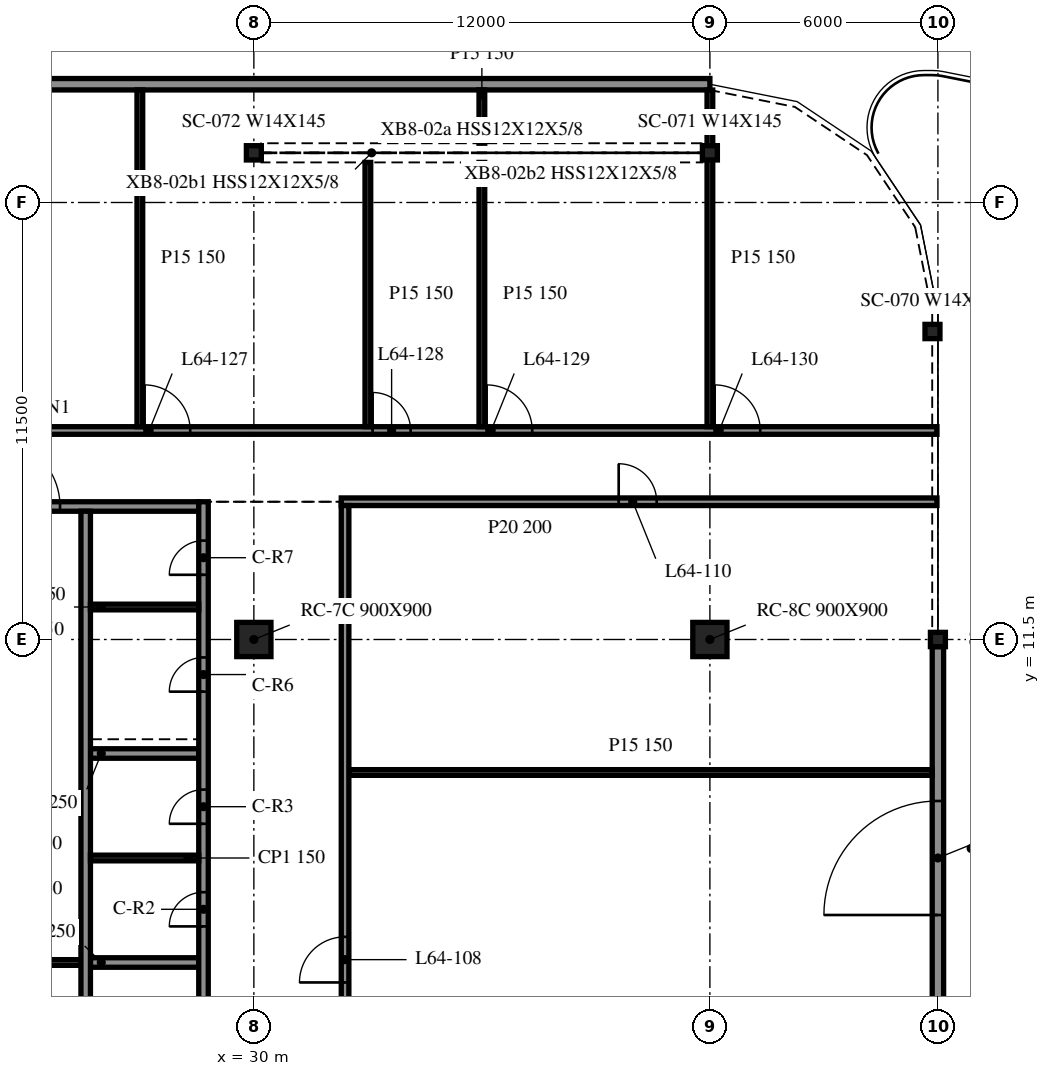
"""IFC4 building model, lengths in metres.
Left out: names, types, materials, properties, quantities, classifications, styles, units other than length and angle.
Written with IfcOpenShell. Run it as: python <this file> out.ifc"""

import sys

from ifc_helpers import new_model, si_unit, direction, frame, frame_2d, origin, origin_2d, place, context, subcontext, project, spatial, rectangle, i_section, extrude, element, fill, save


model = new_model("IFC4")
c1 = context("Model", 3, precision=1e-05, world=origin(), true_north=direction((0.0, 1.0)))
c2 = subcontext(c1, "Body", "Model", "MODEL_VIEW")
j1 = project(units=[si_unit("LENGTHUNIT", "METRE"), si_unit("PLANEANGLEUNIT", "RADIAN")], contexts=[c1])
p1 = place(None, origin())
s1 = spatial("IfcSite", under=j1, at=p1, CompositionType="ELEMENT")
p2 = place(p1, origin())
s2 = spatial("IfcBuilding", under=s1, at=p2, CompositionType="ELEMENT")
p3 = place(p2, frame((0.0, 0.0, 263.3)))
s3 = spatial("IfcBuildingStorey", under=s2, at=p3, CompositionType="ELEMENT", Elevation=263.3)
for number, where, z_axis, x_axis in (
    (1, (30.0, 11.5, -0.34), (0.0, 0.0, 1.0), (1.0, 0.0, 0.0)),
    (2, (42.0, 11.5, -0.34), (0.0, 0.0, 1.0), (1.0, 0.0, 0.0)),
):
    element("IfcColumn", number, at=place(p3, frame(where, z_axis=z_axis, x_axis=x_axis)), inside=s3, PredefinedType="COLUMN", context=c2, shape_type="SweptSolid", body=[
        extrude(rectangle(XDim=0.9, YDim=0.9, at=origin_2d()), origin(), (0.0, 0.0, 1.0), 3.8),
    ])
for number, where, z_axis, x_axis in (
    (3, (47.857, 19.605, -0.34), (0.0, 0.0, 1.0), (1.0, 0.0, 0.0)),
    (4, (42.0, 24.307, -0.34), (0.0, 0.0, 1.0), (1.0, 0.0, 0.0)),
    (5, (30.0, 24.307, -0.34), (0.0, 0.0, 1.0), (1.0, 0.0, 0.0)),
    (6, (48.0, 11.5, -0.34), (0.0, 0.0, 1.0), (1.0, 0.0, 0.0)),
):
    element("IfcColumn", number, at=place(p3, frame(where, z_axis=z_axis, x_axis=x_axis)), inside=s3, PredefinedType="COLUMN", context=c2, shape_type="SweptSolid", body=[
        extrude(i_section(OverallWidth=0.394, OverallDepth=0.376, WebThickness=0.017, FlangeThickness=0.028, at=origin_2d()), origin(), (0.0, 0.0, 1.0), 3.8),
    ])
p4 = place(p3, frame((42.0, 26.112, 0.0), z_axis=(0.0, 0.0, 1.0), x_axis=(-1.0, 0.0, 0.0)))
e7 = element("IfcWall", 7, at=p4, inside=s3, PredefinedType="NOTDEFINED", context=c2, shape_type="SweptSolid", body=[
    extrude(rectangle(XDim=84.0, YDim=0.3, at=frame_2d((42.0, 0.0))), origin(), (0.0, 0.0, 1.0), 2.853),
])
p5 = place(p3, frame((48.0, 0.188, 0.0), z_axis=(0.0, 0.0, 1.0), x_axis=(0.0, 1.0, 0.0)))
e8 = element("IfcWall", 8, at=p5, inside=s3, PredefinedType="NOTDEFINED", context=c2, shape_type="SweptSolid", body=[
    extrude(rectangle(XDim=11.124, YDim=0.3, at=frame_2d((5.562, 0.0))), origin(), (0.0, 0.0, 1.0), 2.853),
])
p6 = place(p5, frame((4.062, 0.0, 0.0)))
e9 = element("IfcOpeningElement", 9, at=p6, cuts=e8, PredefinedType="OPENING", context=c2, shape_type="SweptSolid", body=[
    extrude(rectangle(XDim=3.0, YDim=2.4, at=frame_2d((1.5, 1.2))), frame((0.0, 0.16, 0.0), z_axis=(0.0, -1.0, 0.0), x_axis=(1.0, 0.0, 0.0)), (0.0, 0.0, 1.0), 0.32),
])
p7 = place(p3, frame((28.675, -9.125, 0.0), z_axis=(0.0, 0.0, 1.0), x_axis=(0.0, 1.0, 0.0)))
e10 = element("IfcWall", 10, at=p7, inside=s3, PredefinedType="SOLIDWALL", context=c2, shape_type="SweptSolid", body=[
    extrude(rectangle(XDim=24.25, YDim=0.25, at=frame_2d((12.125, 0.0))), origin(), (0.0, 0.0, 1.0), 3.46),
])
p8 = place(p7, frame((13.075, 0.0, 0.0)))
e11 = element("IfcOpeningElement", 11, at=p8, cuts=e10, PredefinedType="OPENING", context=c2, shape_type="SweptSolid", body=[
    extrude(rectangle(XDim=0.9, YDim=2.1, at=frame_2d((0.45, 1.05))), frame((0.0, 0.135, 0.0), z_axis=(0.0, -1.0, 0.0), x_axis=(1.0, 0.0, 0.0)), (0.0, 0.0, 1.0), 0.27),
])
p9 = place(p7, frame((15.775, 0.0, 0.0)))
e12 = element("IfcOpeningElement", 12, at=p9, cuts=e10, PredefinedType="OPENING", context=c2, shape_type="SweptSolid", body=[
    extrude(rectangle(XDim=0.9, YDim=2.1, at=frame_2d((0.45, 1.05))), frame((0.0, 0.135, 0.0), z_axis=(0.0, -1.0, 0.0), x_axis=(1.0, 0.0, 0.0)), (0.0, 0.0, 1.0), 0.27),
])
p10 = place(p7, frame((19.252, 0.0, 0.0)))
e13 = element("IfcOpeningElement", 13, at=p10, cuts=e10, PredefinedType="OPENING", context=c2, shape_type="SweptSolid", body=[
    extrude(rectangle(XDim=0.9, YDim=2.1, at=frame_2d((0.45, 1.05))), frame((0.0, 0.135, 0.0), z_axis=(0.0, -1.0, 0.0), x_axis=(1.0, 0.0, 0.0)), (0.0, 0.0, 1.0), 0.27),
])
p11 = place(p7, frame((22.327, 0.0, 0.0)))
e14 = element("IfcOpeningElement", 14, at=p11, cuts=e10, PredefinedType="OPENING", context=c2, shape_type="SweptSolid", body=[
    extrude(rectangle(XDim=0.9, YDim=2.1, at=frame_2d((0.45, 1.05))), frame((0.0, 0.135, 0.0), z_axis=(0.0, -1.0, 0.0), x_axis=(1.0, 0.0, 0.0)), (0.0, 0.0, 1.0), 0.27),
])
p12 = place(p3, frame((19.45, 15.0, 0.0), z_axis=(0.0, 0.0, 1.0), x_axis=(1.0, 0.0, 0.0)))
e15 = element("IfcWall", 15, at=p12, inside=s3, PredefinedType="SOLIDWALL", context=c2, shape_type="SweptSolid", body=[
    extrude(rectangle(XDim=9.1, YDim=0.25, at=frame_2d((4.55, 0.0))), origin(), (0.0, 0.0, 1.0), 3.46),
])
p13 = place(p12, frame((3.65, 0.0, 0.0)))
e16 = element("IfcOpeningElement", 16, at=p13, cuts=e15, PredefinedType="OPENING", context=c2, shape_type="SweptSolid", body=[
    extrude(rectangle(XDim=1.8, YDim=2.1, at=frame_2d((0.9, 1.05))), frame((0.0, 0.135, 0.0), z_axis=(0.0, -1.0, 0.0), x_axis=(1.0, 0.0, 0.0)), (0.0, 0.0, 1.0), 0.27),
])
p14 = place(p3, frame((25.575, 14.875, 0.0), z_axis=(0.0, 0.0, 1.0), x_axis=(0.0, -1.0, 0.0)))
e17 = element("IfcWall", 17, at=p14, inside=s3, PredefinedType="SOLIDWALL", context=c2, shape_type="SweptSolid", body=[
    extrude(rectangle(XDim=17.5, YDim=0.25, at=frame_2d((8.75, 0.0))), origin(), (0.0, 0.0, 1.0), 3.46),
])
p15 = place(p14, frame((15.45, 0.0, 0.0)))
e18 = element("IfcOpeningElement", 18, at=p15, cuts=e17, PredefinedType="OPENING", context=c2, shape_type="SweptSolid", body=[
    extrude(rectangle(XDim=1.1, YDim=2.1, at=frame_2d((0.55, 1.05))), frame((0.0, 0.135, 0.0), z_axis=(0.0, -1.0, 0.0), x_axis=(1.0, 0.0, 0.0)), (0.0, 0.0, 1.0), 0.27),
])
p16 = place(p14, frame((12.8, 0.0, 0.0)))
e19 = element("IfcOpeningElement", 19, at=p16, cuts=e17, PredefinedType="OPENING", context=c2, shape_type="SweptSolid", body=[
    extrude(rectangle(XDim=0.9, YDim=2.1, at=frame_2d((0.45, 1.05))), frame((0.0, 0.135, 0.0), z_axis=(0.0, -1.0, 0.0), x_axis=(1.0, 0.0, 0.0)), (0.0, 0.0, 1.0), 0.27),
])
for number, where, z_axis, x_axis in (
    (20, (25.7, 3.0, 0.0), (0.0, 0.0, 1.0), (1.0, 0.0, 0.0)),
    (21, (25.7, 8.5, 0.0), (0.0, 0.0, 1.0), (1.0, 0.0, 0.0)),
):
    element("IfcWall", number, at=place(p3, frame(where, z_axis=z_axis, x_axis=x_axis)), inside=s3, PredefinedType="SOLIDWALL", context=c2, shape_type="SweptSolid", body=[
        extrude(rectangle(XDim=2.85, YDim=0.25, at=frame_2d((1.425, 0.0))), origin(), (0.0, 0.0, 1.0), 3.46),
    ])
p17 = place(p3, frame((22.55, 3.0, 0.0), z_axis=(0.0, 0.0, 1.0), x_axis=(1.0, 0.0, 0.0)))
e22 = element("IfcWall", 22, at=p17, inside=s3, PredefinedType="PARTITIONING", context=c2, shape_type="SweptSolid", body=[
    extrude(rectangle(XDim=2.9, YDim=0.15, at=frame_2d((1.45, 0.0))), origin(), (0.0, 0.0, 1.0), 3.46),
])
for number, where, z_axis, x_axis in (
    (23, (25.7, 5.75, 0.0), (0.0, 0.0, 1.0), (1.0, 0.0, 0.0)),
    (24, (25.7, 12.355, 0.0), (0.0, 0.0, 1.0), (1.0, 0.0, 0.0)),
):
    element("IfcWall", number, at=place(p3, frame(where, z_axis=z_axis, x_axis=x_axis)), inside=s3, PredefinedType="PARTITIONING", context=c2, shape_type="SweptSolid", body=[
        extrude(rectangle(XDim=2.85, YDim=0.15, at=frame_2d((1.425, 0.0))), origin(), (0.0, 0.0, 1.0), 3.46),
    ])
p18 = place(p3, frame((32.5, 8.0, 0.0), z_axis=(0.0, 0.0, 1.0), x_axis=(1.0, 0.0, 0.0)))
e25 = element("IfcWall", 25, at=p18, inside=s3, PredefinedType="PARTITIONING", context=c2, shape_type="SweptSolid", body=[
    extrude(rectangle(XDim=15.35, YDim=0.15, at=frame_2d((7.675, 0.0))), origin(), (0.0, 0.0, 1.0), 3.46),
])
p19 = place(p3, frame((32.3, 15.125, 0.0), z_axis=(0.0, 0.0, 1.0), x_axis=(1.0, 0.0, 0.0)))
e26 = element("IfcWall", 26, at=p19, inside=s3, PredefinedType="PARTITIONING", context=c2, shape_type="SweptSolid", body=[
    extrude(rectangle(XDim=15.675, YDim=0.2, at=frame_2d((7.837, 0.0))), origin(), (0.0, 0.0, 1.0), 3.46),
])
p20 = place(p19, frame((7.3, 0.0, 0.0)))
e27 = element("IfcOpeningElement", 27, at=p20, cuts=e26, PredefinedType="OPENING", context=c2, shape_type="SweptSolid", body=[
    extrude(rectangle(XDim=1.0, YDim=2.1, at=frame_2d((0.5, 1.05))), frame((0.0, 0.11, 0.0), z_axis=(0.0, -1.0, 0.0), x_axis=(1.0, 0.0, 0.0)), (0.0, 0.0, 1.0), 0.22),
])
p21 = place(p3, frame((-47.975, 17.0, 0.0), z_axis=(0.0, 0.0, 1.0), x_axis=(1.0, 0.0, 0.0)))
e28 = element("IfcWall", 28, at=p21, inside=s3, PredefinedType="PARTITIONING", context=c2, shape_type="SweptSolid", body=[
    extrude(rectangle(XDim=95.95, YDim=0.2, at=frame_2d((47.975, 0.0))), origin(), (0.0, 0.0, 1.0), 3.46),
])
p22 = place(p21, frame((4.5, 0.0, 0.0)))
e29 = element("IfcOpeningElement", 29, at=p22, cuts=e28, PredefinedType="OPENING", context=c2, shape_type="SweptSolid", body=[
    extrude(rectangle(XDim=1.0, YDim=2.1, at=frame_2d((0.5, 1.05))), frame((0.0, 0.11, 0.0), z_axis=(0.0, -1.0, 0.0), x_axis=(1.0, 0.0, 0.0)), (0.0, 0.0, 1.0), 0.22),
])
p23 = place(p21, frame((10.3, 0.0, 0.0)))
e30 = element("IfcOpeningElement", 30, at=p23, cuts=e28, PredefinedType="OPENING", context=c2, shape_type="SweptSolid", body=[
    extrude(rectangle(XDim=1.2, YDim=2.1, at=frame_2d((0.6, 1.05))), frame((0.0, 0.11, 0.0), z_axis=(0.0, -1.0, 0.0), x_axis=(1.0, 0.0, 0.0)), (0.0, 0.0, 1.0), 0.22),
])
p24 = place(p21, frame((16.3, 0.0, 0.0)))
e31 = element("IfcOpeningElement", 31, at=p24, cuts=e28, PredefinedType="OPENING", context=c2, shape_type="SweptSolid", body=[
    extrude(rectangle(XDim=1.2, YDim=2.1, at=frame_2d((0.6, 1.05))), frame((0.0, 0.11, 0.0), z_axis=(0.0, -1.0, 0.0), x_axis=(1.0, 0.0, 0.0)), (0.0, 0.0, 1.0), 0.22),
])
p25 = place(p21, frame((19.5, 0.0, 0.0)))
e32 = element("IfcOpeningElement", 32, at=p25, cuts=e28, PredefinedType="OPENING", context=c2, shape_type="SweptSolid", body=[
    extrude(rectangle(XDim=1.0, YDim=2.1, at=frame_2d((0.5, 1.05))), frame((0.0, 0.11, 0.0), z_axis=(0.0, -1.0, 0.0), x_axis=(1.0, 0.0, 0.0)), (0.0, 0.0, 1.0), 0.22),
])
p26 = place(p21, frame((25.3, 0.0, 0.0)))
e33 = element("IfcOpeningElement", 33, at=p26, cuts=e28, PredefinedType="OPENING", context=c2, shape_type="SweptSolid", body=[
    extrude(rectangle(XDim=1.2, YDim=2.1, at=frame_2d((0.6, 1.05))), frame((0.0, 0.11, 0.0), z_axis=(0.0, -1.0, 0.0), x_axis=(1.0, 0.0, 0.0)), (0.0, 0.0, 1.0), 0.22),
])
p27 = place(p21, frame((31.3, 0.0, 0.0)))
e34 = element("IfcOpeningElement", 34, at=p27, cuts=e28, PredefinedType="OPENING", context=c2, shape_type="SweptSolid", body=[
    extrude(rectangle(XDim=1.2, YDim=2.1, at=frame_2d((0.6, 1.05))), frame((0.0, 0.11, 0.0), z_axis=(0.0, -1.0, 0.0), x_axis=(1.0, 0.0, 0.0)), (0.0, 0.0, 1.0), 0.22),
])
p28 = place(p21, frame((37.5, 0.0, 0.0)))
e35 = element("IfcOpeningElement", 35, at=p28, cuts=e28, PredefinedType="OPENING", context=c2, shape_type="SweptSolid", body=[
    extrude(rectangle(XDim=1.0, YDim=2.1, at=frame_2d((0.5, 1.05))), frame((0.0, 0.11, 0.0), z_axis=(0.0, -1.0, 0.0), x_axis=(1.0, 0.0, 0.0)), (0.0, 0.0, 1.0), 0.22),
])
p29 = place(p21, frame((40.3, 0.0, 0.0)))
e36 = element("IfcOpeningElement", 36, at=p29, cuts=e28, PredefinedType="OPENING", context=c2, shape_type="SweptSolid", body=[
    extrude(rectangle(XDim=1.2, YDim=2.1, at=frame_2d((0.6, 1.05))), frame((0.0, 0.11, 0.0), z_axis=(0.0, -1.0, 0.0), x_axis=(1.0, 0.0, 0.0)), (0.0, 0.0, 1.0), 0.22),
])
p30 = place(p21, frame((46.3, 0.0, 0.0)))
e37 = element("IfcOpeningElement", 37, at=p30, cuts=e28, PredefinedType="OPENING", context=c2, shape_type="SweptSolid", body=[
    extrude(rectangle(XDim=1.2, YDim=2.1, at=frame_2d((0.6, 1.05))), frame((0.0, 0.11, 0.0), z_axis=(0.0, -1.0, 0.0), x_axis=(1.0, 0.0, 0.0)), (0.0, 0.0, 1.0), 0.22),
])
p31 = place(p21, frame((48.1, 0.0, 0.0)))
e38 = element("IfcOpeningElement", 38, at=p31, cuts=e28, PredefinedType="OPENING", context=c2, shape_type="SweptSolid", body=[
    extrude(rectangle(XDim=1.0, YDim=2.1, at=frame_2d((0.5, 1.05))), frame((0.0, 0.11, 0.0), z_axis=(0.0, -1.0, 0.0), x_axis=(1.0, 0.0, 0.0)), (0.0, 0.0, 1.0), 0.22),
])
p32 = place(p21, frame((54.1, 0.0, 0.0)))
e39 = element("IfcOpeningElement", 39, at=p32, cuts=e28, PredefinedType="OPENING", context=c2, shape_type="SweptSolid", body=[
    extrude(rectangle(XDim=1.2, YDim=2.1, at=frame_2d((0.6, 1.05))), frame((0.0, 0.11, 0.0), z_axis=(0.0, -1.0, 0.0), x_axis=(1.0, 0.0, 0.0)), (0.0, 0.0, 1.0), 0.22),
])
p33 = place(p21, frame((60.1, 0.0, 0.0)))
e40 = element("IfcOpeningElement", 40, at=p33, cuts=e28, PredefinedType="OPENING", context=c2, shape_type="SweptSolid", body=[
    extrude(rectangle(XDim=1.2, YDim=2.1, at=frame_2d((0.6, 1.05))), frame((0.0, 0.11, 0.0), z_axis=(0.0, -1.0, 0.0), x_axis=(1.0, 0.0, 0.0)), (0.0, 0.0, 1.0), 0.22),
])
p34 = place(p21, frame((63.1, 0.0, 0.0)))
e41 = element("IfcOpeningElement", 41, at=p34, cuts=e28, PredefinedType="OPENING", context=c2, shape_type="SweptSolid", body=[
    extrude(rectangle(XDim=1.0, YDim=2.1, at=frame_2d((0.5, 1.05))), frame((0.0, 0.11, 0.0), z_axis=(0.0, -1.0, 0.0), x_axis=(1.0, 0.0, 0.0)), (0.0, 0.0, 1.0), 0.22),
])
p35 = place(p21, frame((69.1, 0.0, 0.0)))
e42 = element("IfcOpeningElement", 42, at=p35, cuts=e28, PredefinedType="OPENING", context=c2, shape_type="SweptSolid", body=[
    extrude(rectangle(XDim=1.2, YDim=2.1, at=frame_2d((0.6, 1.05))), frame((0.0, 0.11, 0.0), z_axis=(0.0, -1.0, 0.0), x_axis=(1.0, 0.0, 0.0)), (0.0, 0.0, 1.0), 0.22),
])
p36 = place(p21, frame((75.1, 0.0, 0.0)))
e43 = element("IfcOpeningElement", 43, at=p36, cuts=e28, PredefinedType="OPENING", context=c2, shape_type="SweptSolid", body=[
    extrude(rectangle(XDim=1.2, YDim=2.1, at=frame_2d((0.6, 1.05))), frame((0.0, 0.11, 0.0), z_axis=(0.0, -1.0, 0.0), x_axis=(1.0, 0.0, 0.0)), (0.0, 0.0, 1.0), 0.22),
])
p37 = place(p21, frame((81.1, 0.0, 0.0)))
e44 = element("IfcOpeningElement", 44, at=p37, cuts=e28, PredefinedType="OPENING", context=c2, shape_type="SweptSolid", body=[
    extrude(rectangle(XDim=1.0, YDim=2.1, at=frame_2d((0.5, 1.05))), frame((0.0, 0.11, 0.0), z_axis=(0.0, -1.0, 0.0), x_axis=(1.0, 0.0, 0.0)), (0.0, 0.0, 1.0), 0.22),
])
p38 = place(p21, frame((84.1, 0.0, 0.0)))
e45 = element("IfcOpeningElement", 45, at=p38, cuts=e28, PredefinedType="OPENING", context=c2, shape_type="SweptSolid", body=[
    extrude(rectangle(XDim=1.2, YDim=2.1, at=frame_2d((0.6, 1.05))), frame((0.0, 0.11, 0.0), z_axis=(0.0, -1.0, 0.0), x_axis=(1.0, 0.0, 0.0)), (0.0, 0.0, 1.0), 0.22),
])
p39 = place(p21, frame((90.1, 0.0, 0.0)))
e46 = element("IfcOpeningElement", 46, at=p39, cuts=e28, PredefinedType="OPENING", context=c2, shape_type="SweptSolid", body=[
    extrude(rectangle(XDim=1.2, YDim=2.1, at=frame_2d((0.6, 1.05))), frame((0.0, 0.11, 0.0), z_axis=(0.0, -1.0, 0.0), x_axis=(1.0, 0.0, 0.0)), (0.0, 0.0, 1.0), 0.22),
])
p40 = place(p3, frame((27.0, 17.1, 0.0), z_axis=(0.0, 0.0, 1.0), x_axis=(0.0, 1.0, 0.0)))
e47 = element("IfcWall", 47, at=p40, inside=s3, PredefinedType="PARTITIONING", context=c2, shape_type="SweptSolid", body=[
    extrude(rectangle(XDim=8.862, YDim=0.15, at=frame_2d((4.431, 0.0))), origin(), (0.0, 0.0, 1.0), 3.46),
])
p41 = place(p3, frame((32.4, -9.025, 0.0), z_axis=(0.0, 0.0, 1.0), x_axis=(0.0, 1.0, 0.0)))
e48 = element("IfcWall", 48, at=p41, inside=s3, PredefinedType="PARTITIONING", context=c2, shape_type="SweptSolid", body=[
    extrude(rectangle(XDim=24.05, YDim=0.2, at=frame_2d((12.025, 0.0))), origin(), (0.0, 0.0, 1.0), 3.46),
])
p42 = place(p41, frame((11.5, 0.0, 0.0)))
e49 = element("IfcOpeningElement", 49, at=p42, cuts=e48, PredefinedType="OPENING", context=c2, shape_type="SweptSolid", body=[
    extrude(rectangle(XDim=1.2, YDim=2.1, at=frame_2d((0.6, 1.05))), frame((0.0, 0.11, 0.0), z_axis=(0.0, -1.0, 0.0), x_axis=(1.0, 0.0, 0.0)), (0.0, 0.0, 1.0), 0.22),
])
for number, where, z_axis, x_axis in (
    (50, (33.0, 17.1, 0.0), (0.0, 0.0, 1.0), (0.0, 1.0, 0.0)),
    (51, (36.0, 17.1, 0.0), (0.0, 0.0, 1.0), (0.0, 1.0, 0.0)),
):
    element("IfcWall", number, at=place(p3, frame(where, z_axis=z_axis, x_axis=x_axis)), inside=s3, PredefinedType="PARTITIONING", context=c2, shape_type="SweptSolid", body=[
        extrude(rectangle(XDim=6.955, YDim=0.15, at=frame_2d((3.477, 0.0))), origin(), (0.0, 0.0, 1.0), 3.46),
    ])
p43 = place(p3, frame((36.0, 24.559, 0.0), z_axis=(0.0, 0.0, 1.0), x_axis=(0.0, 1.0, 0.0)))
e52 = element("IfcWall", 52, at=p43, inside=s3, PredefinedType="PARTITIONING", context=c2, shape_type="SweptSolid", body=[
    extrude(rectangle(XDim=1.403, YDim=0.15, at=frame_2d((0.701, 0.0))), origin(), (0.0, 0.0, 1.0), 3.46),
])
p44 = place(p3, frame((42.0, 17.1, 0.0), z_axis=(0.0, 0.0, 1.0), x_axis=(0.0, 1.0, 0.0)))
e53 = element("IfcWall", 53, at=p44, inside=s3, PredefinedType="PARTITIONING", context=c2, shape_type="SweptSolid", body=[
    extrude(rectangle(XDim=8.859, YDim=0.15, at=frame_2d((4.429, 0.0))), origin(), (0.0, 0.0, 1.0), 3.46),
])
p45 = place(p6, origin())
e54 = element("IfcDoor", 54, at=p45, inside=s3, OperationType="SINGLE_SWING_LEFT", PredefinedType="DOOR", context=c2, shape_type="SweptSolid", body=[
    extrude(rectangle(XDim=3.0, YDim=2.4, at=frame_2d((1.5, 1.2))), frame((0.0, 0.025, 0.0), z_axis=(0.0, -1.0, 0.0), x_axis=(1.0, 0.0, 0.0)), (0.0, 0.0, 1.0), 0.05),
])
fill(e9, e54)
p46 = place(p13, origin())
e55 = element("IfcDoor", 55, at=p46, inside=s3, OperationType="DOUBLE_DOOR_SINGLE_SWING", PredefinedType="DOOR", context=c2, shape_type="SweptSolid", body=[
    extrude(rectangle(XDim=1.8, YDim=2.1, at=frame_2d((0.9, 1.05))), frame((0.0, 0.025, 0.0), z_axis=(0.0, -1.0, 0.0), x_axis=(1.0, 0.0, 0.0)), (0.0, 0.0, 1.0), 0.05),
])
fill(e16, e55)
p47 = place(p8, origin())
e56 = element("IfcDoor", 56, at=p47, inside=s3, OperationType="SINGLE_SWING_RIGHT", PredefinedType="DOOR", context=c2, shape_type="SweptSolid", body=[
    extrude(rectangle(XDim=0.9, YDim=2.1, at=frame_2d((0.45, 1.05))), frame((0.0, 0.025, 0.0), z_axis=(0.0, -1.0, 0.0), x_axis=(1.0, 0.0, 0.0)), (0.0, 0.0, 1.0), 0.05),
])
fill(e11, e56)
p48 = place(p9, origin())
e57 = element("IfcDoor", 57, at=p48, inside=s3, OperationType="SINGLE_SWING_LEFT", PredefinedType="DOOR", context=c2, shape_type="SweptSolid", body=[
    extrude(rectangle(XDim=0.9, YDim=2.1, at=frame_2d((0.45, 1.05))), frame((0.0, 0.025, 0.0), z_axis=(0.0, -1.0, 0.0), x_axis=(1.0, 0.0, 0.0)), (0.0, 0.0, 1.0), 0.05),
])
fill(e12, e57)
p49 = place(p10, origin())
e58 = element("IfcDoor", 58, at=p49, inside=s3, OperationType="SINGLE_SWING_RIGHT", PredefinedType="DOOR", context=c2, shape_type="SweptSolid", body=[
    extrude(rectangle(XDim=0.9, YDim=2.1, at=frame_2d((0.45, 1.05))), frame((0.0, 0.025, 0.0), z_axis=(0.0, -1.0, 0.0), x_axis=(1.0, 0.0, 0.0)), (0.0, 0.0, 1.0), 0.05),
])
fill(e13, e58)
p50 = place(p11, origin())
e59 = element("IfcDoor", 59, at=p50, inside=s3, OperationType="SINGLE_SWING_LEFT", PredefinedType="DOOR", context=c2, shape_type="SweptSolid", body=[
    extrude(rectangle(XDim=0.9, YDim=2.1, at=frame_2d((0.45, 1.05))), frame((0.0, 0.025, 0.0), z_axis=(0.0, -1.0, 0.0), x_axis=(1.0, 0.0, 0.0)), (0.0, 0.0, 1.0), 0.05),
])
fill(e14, e59)
p51 = place(p42, origin())
e60 = element("IfcDoor", 60, at=p51, inside=s3, OperationType="SINGLE_SWING_LEFT", PredefinedType="DOOR", context=c2, shape_type="SweptSolid", body=[
    extrude(rectangle(XDim=1.2, YDim=2.1, at=frame_2d((0.6, 1.05))), frame((0.0, 0.025, 0.0), z_axis=(0.0, -1.0, 0.0), x_axis=(1.0, 0.0, 0.0)), (0.0, 0.0, 1.0), 0.05),
])
fill(e49, e60)
p52 = place(p20, origin())
e61 = element("IfcDoor", 61, at=p52, inside=s3, OperationType="SINGLE_SWING_LEFT", PredefinedType="DOOR", context=c2, shape_type="SweptSolid", body=[
    extrude(rectangle(XDim=1.0, YDim=2.1, at=frame_2d((0.5, 1.05))), frame((0.0, 0.025, 0.0), z_axis=(0.0, -1.0, 0.0), x_axis=(1.0, 0.0, 0.0)), (0.0, 0.0, 1.0), 0.05),
])
fill(e27, e61)
p53 = place(p36, origin())
e62 = element("IfcDoor", 62, at=p53, inside=s3, OperationType="SINGLE_SWING_RIGHT", PredefinedType="DOOR", context=c2, shape_type="SweptSolid", body=[
    extrude(rectangle(XDim=1.2, YDim=2.1, at=frame_2d((0.6, 1.05))), frame((0.0, 0.025, 0.0), z_axis=(0.0, -1.0, 0.0), x_axis=(1.0, 0.0, 0.0)), (0.0, 0.0, 1.0), 0.05),
])
fill(e43, e62)
p54 = place(p37, origin())
e63 = element("IfcDoor", 63, at=p54, inside=s3, OperationType="SINGLE_SWING_RIGHT", PredefinedType="DOOR", context=c2, shape_type="SweptSolid", body=[
    extrude(rectangle(XDim=1.0, YDim=2.1, at=frame_2d((0.5, 1.05))), frame((0.0, 0.025, 0.0), z_axis=(0.0, -1.0, 0.0), x_axis=(1.0, 0.0, 0.0)), (0.0, 0.0, 1.0), 0.05),
])
fill(e44, e63)
p55 = place(p38, origin())
e64 = element("IfcDoor", 64, at=p55, inside=s3, OperationType="SINGLE_SWING_RIGHT", PredefinedType="DOOR", context=c2, shape_type="SweptSolid", body=[
    extrude(rectangle(XDim=1.2, YDim=2.1, at=frame_2d((0.6, 1.05))), frame((0.0, 0.025, 0.0), z_axis=(0.0, -1.0, 0.0), x_axis=(1.0, 0.0, 0.0)), (0.0, 0.0, 1.0), 0.05),
])
fill(e45, e64)
p56 = place(p39, origin())
e65 = element("IfcDoor", 65, at=p56, inside=s3, OperationType="SINGLE_SWING_RIGHT", PredefinedType="DOOR", context=c2, shape_type="SweptSolid", body=[
    extrude(rectangle(XDim=1.2, YDim=2.1, at=frame_2d((0.6, 1.05))), frame((0.0, 0.025, 0.0), z_axis=(0.0, -1.0, 0.0), x_axis=(1.0, 0.0, 0.0)), (0.0, 0.0, 1.0), 0.05),
])
fill(e46, e65)
save(model, sys.argv[1])
